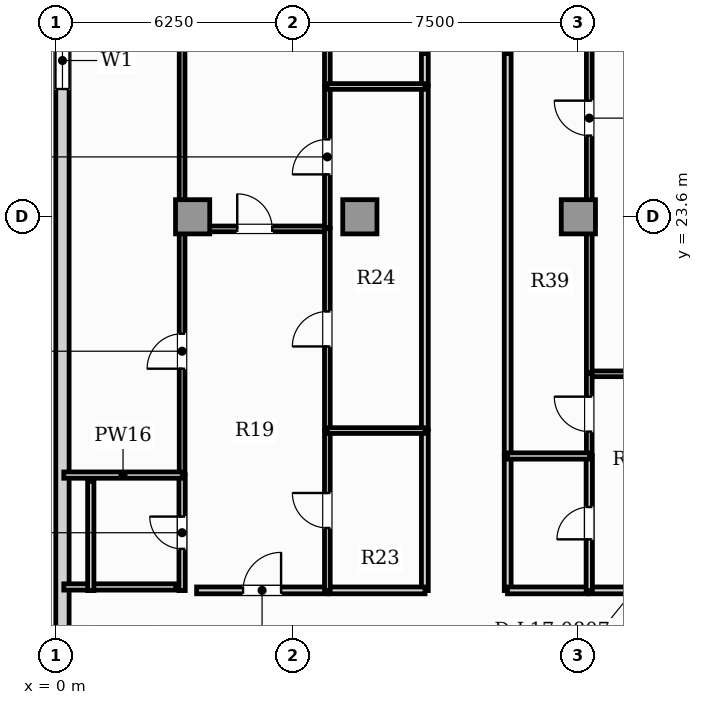
"""IFC4 building model, lengths in metres.
Left out: names, types, materials, properties, quantities, classifications, styles, units other than length and angle.
Written with IfcOpenShell. Run it as: python <this file> out.ifc"""

import sys

from ifc_helpers import new_model, si_unit, direction, frame, frame_2d, origin, origin_2d, place, context, subcontext, project, spatial, rectangle, extrude, element, fill, save


model = new_model("IFC4")
c1 = context("Model", 3, precision=1e-05, world=origin(), true_north=direction((0.0, 1.0)))
c2 = subcontext(c1, "Body", "Model", "MODEL_VIEW")
j1 = project(units=[si_unit("LENGTHUNIT", "METRE"), si_unit("PLANEANGLEUNIT", "RADIAN")], contexts=[c1])
p1 = place(None, origin())
s1 = spatial("IfcSite", under=j1, at=p1, CompositionType="ELEMENT")
p2 = place(p1, origin())
s2 = spatial("IfcBuilding", under=s1, at=p2, CompositionType="ELEMENT")
p3 = place(p2, frame((0.0, 0.0, 72.15)))
s3 = spatial("IfcBuildingStorey", under=s2, at=p3, CompositionType="ELEMENT", Elevation=72.15)
for number, where, z_axis, x_axis in (
    (1, (3.6, 23.6, 0.0), (0.0, 0.0, 1.0), (1.0, 0.0, 0.0)),
    (2, (8.0, 23.6, 0.0), (0.0, 0.0, 1.0), (1.0, 0.0, 0.0)),
    (3, (13.75, 23.6, 0.0), (0.0, 0.0, 1.0), (1.0, 0.0, 0.0)),
):
    element("IfcColumn", number, at=place(p3, frame(where, z_axis=z_axis, x_axis=x_axis)), inside=s3, PredefinedType="COLUMN", context=c2, shape_type="SweptSolid", body=[
        extrude(rectangle(XDim=0.9, YDim=0.9, at=origin_2d()), origin(), (0.0, 0.0, 1.0), 3.85),
    ])
p4 = place(p3, frame((0.175, 43.16, 0.0), z_axis=(0.0, 0.0, 1.0), x_axis=(0.0, -1.0, 0.0)))
e4 = element("IfcWall", 4, at=p4, inside=s3, PredefinedType="SOLIDWALL", context=c2, shape_type="SweptSolid", body=[
    extrude(rectangle(XDim=39.92, YDim=0.35, at=frame_2d((19.96, 0.0))), origin(), (0.0, 0.0, 1.0), 3.57),
])
p5 = place(p4, frame((3.34, 0.0, 0.95)))
e5 = element("IfcOpeningElement", 5, at=p5, cuts=e4, PredefinedType="OPENING", context=c2, shape_type="SweptSolid", body=[
    extrude(rectangle(XDim=0.9, YDim=1.5, at=frame_2d((0.45, 0.75))), frame((0.0, 0.185, 0.0), z_axis=(0.0, -1.0, 0.0), x_axis=(1.0, 0.0, 0.0)), (0.0, 0.0, 1.0), 0.37),
])
p6 = place(p4, frame((14.698, 0.0, 0.9)))
e6 = element("IfcOpeningElement", 6, at=p6, cuts=e4, PredefinedType="OPENING", context=c2, shape_type="SweptSolid", body=[
    extrude(rectangle(XDim=1.5, YDim=1.95, at=frame_2d((0.75, 0.975))), frame((0.0, 0.185, 0.0), z_axis=(0.0, -1.0, 0.0), x_axis=(1.0, 0.0, 0.0)), (0.0, 0.0, 1.0), 0.37),
])
p7 = place(p3, frame((3.705, 13.77, 0.0), z_axis=(0.0, 0.0, 1.0), x_axis=(1.0, 0.0, 0.0)))
e7 = element("IfcWall", 7, at=p7, inside=s3, PredefinedType="PARTITIONING", context=c2, shape_type="SweptSolid", body=[
    extrude(rectangle(XDim=3.445, YDim=0.18, at=frame_2d((1.722, 0.0))), origin(), (0.0, 0.0, 1.0), 3.57),
])
p8 = place(p7, frame((1.222, 0.0, 0.0)))
e8 = element("IfcOpeningElement", 8, at=p8, cuts=e7, PredefinedType="OPENING", context=c2, shape_type="SweptSolid", body=[
    extrude(rectangle(XDim=1.0, YDim=2.15, at=frame_2d((0.5, 1.075))), frame((0.0, 0.1, 0.0), z_axis=(0.0, -1.0, 0.0), x_axis=(1.0, 0.0, 0.0)), (0.0, 0.0, 1.0), 0.2),
])
p9 = place(p3, frame((9.71, 13.765, 0.0), z_axis=(0.0, 0.0, 1.0), x_axis=(0.0, 1.0, 0.0)))
e9 = element("IfcWall", 9, at=p9, inside=s3, PredefinedType="PARTITIONING", context=c2, shape_type="SweptSolid", body=[
    extrude(rectangle(XDim=4.215, YDim=0.18, at=frame_2d((2.107, 0.0))), origin(), (0.0, 0.0, 1.0), 3.57),
])
p10 = place(p3, frame((7.18, 13.77, 0.0), z_axis=(0.0, 0.0, 1.0), x_axis=(1.0, 0.0, 0.0)))
e10 = element("IfcWall", 10, at=p10, inside=s3, PredefinedType="PARTITIONING", context=c2, shape_type="SweptSolid", body=[
    extrude(rectangle(XDim=2.535, YDim=0.18, at=frame_2d((1.268, 0.0))), origin(), (0.0, 0.0, 1.0), 3.57),
])
p11 = place(p3, frame((9.71, 18.01, 0.0), z_axis=(0.0, 0.0, 1.0), x_axis=(0.0, 1.0, 0.0)))
e11 = element("IfcWall", 11, at=p11, inside=s3, PredefinedType="PARTITIONING", context=c2, shape_type="SweptSolid", body=[
    extrude(rectangle(XDim=9.024, YDim=0.18, at=frame_2d((4.512, 0.0))), origin(), (0.0, 0.0, 1.0), 3.57),
])
p12 = place(p3, frame((9.71, 27.064, 0.0), z_axis=(0.0, 0.0, 1.0), x_axis=(0.0, 1.0, 0.0)))
e12 = element("IfcWall", 12, at=p12, inside=s3, PredefinedType="PARTITIONING", context=c2, shape_type="SweptSolid", body=[
    extrude(rectangle(XDim=0.831, YDim=0.18, at=frame_2d((0.416, 0.0))), origin(), (0.0, 0.0, 1.0), 3.57),
])
p13 = place(p3, frame((14.031, 13.77, 0.0), z_axis=(0.0, 0.0, 1.0), x_axis=(1.0, 0.0, 0.0)))
e13 = element("IfcWall", 13, at=p13, inside=s3, PredefinedType="PARTITIONING", context=c2, shape_type="SweptSolid", body=[
    extrude(rectangle(XDim=3.206, YDim=0.18, at=frame_2d((1.603, 0.0))), origin(), (0.0, 0.0, 1.0), 3.57),
])
p14 = place(p13, frame((1.103, 0.0, 0.0)))
e14 = element("IfcOpeningElement", 14, at=p14, cuts=e13, PredefinedType="OPENING", context=c2, shape_type="SweptSolid", body=[
    extrude(rectangle(XDim=1.0, YDim=2.15, at=frame_2d((0.5, 1.075))), frame((0.0, 0.1, 0.0), z_axis=(0.0, -1.0, 0.0), x_axis=(1.0, 0.0, 0.0)), (0.0, 0.0, 1.0), 0.2),
])
p15 = place(p3, frame((11.89, 13.765, 0.0), z_axis=(0.0, 0.0, 1.0), x_axis=(0.0, 1.0, 0.0)))
e15 = element("IfcWall", 15, at=p15, inside=s3, PredefinedType="PARTITIONING", context=c2, shape_type="SweptSolid", body=[
    extrude(rectangle(XDim=3.546, YDim=0.18, at=frame_2d((1.773, 0.0))), origin(), (0.0, 0.0, 1.0), 3.57),
])
p16 = place(p3, frame((11.885, 13.77, 0.0), z_axis=(0.0, 0.0, 1.0), x_axis=(1.0, 0.0, 0.0)))
e16 = element("IfcWall", 16, at=p16, inside=s3, PredefinedType="PARTITIONING", context=c2, shape_type="SweptSolid", body=[
    extrude(rectangle(XDim=2.116, YDim=0.18, at=frame_2d((1.058, 0.0))), origin(), (0.0, 0.0, 1.0), 3.57),
])
p17 = place(p3, frame((11.89, 17.341, 0.0), z_axis=(0.0, 0.0, 1.0), x_axis=(0.0, 1.0, 0.0)))
e17 = element("IfcWall", 17, at=p17, inside=s3, PredefinedType="PARTITIONING", context=c2, shape_type="SweptSolid", body=[
    extrude(rectangle(XDim=10.554, YDim=0.18, at=frame_2d((5.277, 0.0))), origin(), (0.0, 0.0, 1.0), 3.57),
])
p18 = place(p3, frame((3.318, 23.282, 0.0), z_axis=(0.0, 0.0, 1.0), x_axis=(1.0, 0.0, 0.0)))
e18 = element("IfcWall", 18, at=p18, inside=s3, PredefinedType="PARTITIONING", context=c2, shape_type="SweptSolid", body=[
    extrude(rectangle(XDim=3.832, YDim=0.15, at=frame_2d((1.916, 0.0))), origin(), (0.0, 0.0, 1.0), 3.57),
])
p19 = place(p18, frame((1.456, 0.0, 0.0)))
e19 = element("IfcOpeningElement", 19, at=p19, cuts=e18, PredefinedType="OPENING", context=c2, shape_type="SweptSolid", body=[
    extrude(rectangle(XDim=0.92, YDim=2.1, at=frame_2d((0.46, 1.05))), frame((0.0, 0.085, 0.0), z_axis=(0.0, -1.0, 0.0), x_axis=(1.0, 0.0, 0.0)), (0.0, 0.0, 1.0), 0.17),
])
p20 = place(p3, frame((3.323, 13.765, 0.0), z_axis=(0.0, 0.0, 1.0), x_axis=(0.0, 1.0, 0.0)))
e20 = element("IfcWall", 20, at=p20, inside=s3, PredefinedType="PLUMBINGWALL", context=c2, shape_type="SweptSolid", body=[
    extrude(rectangle(XDim=3.044, YDim=0.165, at=frame_2d((1.522, 0.0))), origin(), (0.0, 0.0, 1.0), 3.57),
])
p21 = place(p20, frame((1.097, 0.0, 0.0)))
e21 = element("IfcOpeningElement", 21, at=p21, cuts=e20, PredefinedType="OPENING", context=c2, shape_type="SweptSolid", body=[
    extrude(rectangle(XDim=0.85, YDim=2.1, at=frame_2d((0.425, 1.05))), frame((0.0, 0.093, 0.0), z_axis=(0.0, -1.0, 0.0), x_axis=(1.0, 0.0, 0.0)), (0.0, 0.0, 1.0), 0.185),
])
p22 = place(p3, frame((3.323, 16.839, 0.0), z_axis=(0.0, 0.0, 1.0), x_axis=(0.0, 1.0, 0.0)))
e22 = element("IfcWall", 22, at=p22, inside=s3, PredefinedType="PARTITIONING", context=c2, shape_type="SweptSolid", body=[
    extrude(rectangle(XDim=6.448, YDim=0.15, at=frame_2d((3.224, 0.0))), origin(), (0.0, 0.0, 1.0), 3.57),
])
p23 = place(p22, frame((2.764, 0.0, 0.0)))
e23 = element("IfcOpeningElement", 23, at=p23, cuts=e22, PredefinedType="OPENING", context=c2, shape_type="SweptSolid", body=[
    extrude(rectangle(XDim=0.92, YDim=2.1, at=frame_2d((0.46, 1.05))), frame((0.0, 0.085, 0.0), z_axis=(0.0, -1.0, 0.0), x_axis=(1.0, 0.0, 0.0)), (0.0, 0.0, 1.0), 0.17),
])
p24 = place(p3, frame((7.145, 13.765, 0.0), z_axis=(0.0, 0.0, 1.0), x_axis=(0.0, 1.0, 0.0)))
e24 = element("IfcWall", 24, at=p24, inside=s3, PredefinedType="PARTITIONING", context=c2, shape_type="SweptSolid", body=[
    extrude(rectangle(XDim=4.215, YDim=0.15, at=frame_2d((2.107, 0.0))), origin(), (0.0, 0.0, 1.0), 3.57),
])
p25 = place(p24, frame((1.647, 0.0, 0.0)))
e25 = element("IfcOpeningElement", 25, at=p25, cuts=e24, PredefinedType="OPENING", context=c2, shape_type="SweptSolid", body=[
    extrude(rectangle(XDim=0.92, YDim=2.1, at=frame_2d((0.46, 1.05))), frame((0.0, 0.085, 0.0), z_axis=(0.0, -1.0, 0.0), x_axis=(1.0, 0.0, 0.0)), (0.0, 0.0, 1.0), 0.17),
])
p26 = place(p3, frame((7.145, 18.01, 0.0), z_axis=(0.0, 0.0, 1.0), x_axis=(0.0, 1.0, 0.0)))
e26 = element("IfcWall", 26, at=p26, inside=s3, PredefinedType="PARTITIONING", context=c2, shape_type="SweptSolid", body=[
    extrude(rectangle(XDim=5.277, YDim=0.15, at=frame_2d((2.639, 0.0))), origin(), (0.0, 0.0, 1.0), 3.57),
])
p27 = place(p26, frame((2.179, 0.0, 0.0)))
e27 = element("IfcOpeningElement", 27, at=p27, cuts=e26, PredefinedType="OPENING", context=c2, shape_type="SweptSolid", body=[
    extrude(rectangle(XDim=0.92, YDim=2.1, at=frame_2d((0.46, 1.05))), frame((0.0, 0.085, 0.0), z_axis=(0.0, -1.0, 0.0), x_axis=(1.0, 0.0, 0.0)), (0.0, 0.0, 1.0), 0.17),
])
p28 = place(p3, frame((3.323, 23.317, 0.0), z_axis=(0.0, 0.0, 1.0), x_axis=(0.0, 1.0, 0.0)))
e28 = element("IfcWall", 28, at=p28, inside=s3, PredefinedType="PARTITIONING", context=c2, shape_type="SweptSolid", body=[
    extrude(rectangle(XDim=15.308, YDim=0.15, at=frame_2d((7.654, 0.0))), origin(), (0.0, 0.0, 1.0), 3.57),
])
p29 = place(p28, frame((7.194, 0.0, 0.0)))
e29 = element("IfcOpeningElement", 29, at=p29, cuts=e28, PredefinedType="OPENING", context=c2, shape_type="SweptSolid", body=[
    extrude(rectangle(XDim=0.92, YDim=2.1, at=frame_2d((0.46, 1.05))), frame((0.0, 0.085, 0.0), z_axis=(0.0, -1.0, 0.0), x_axis=(1.0, 0.0, 0.0)), (0.0, 0.0, 1.0), 0.17),
])
p30 = place(p3, frame((7.145, 23.317, 0.0), z_axis=(0.0, 0.0, 1.0), x_axis=(0.0, 1.0, 0.0)))
e30 = element("IfcWall", 30, at=p30, inside=s3, PredefinedType="PARTITIONING", context=c2, shape_type="SweptSolid", body=[
    extrude(rectangle(XDim=3.717, YDim=0.15, at=frame_2d((1.858, 0.0))), origin(), (0.0, 0.0, 1.0), 3.57),
])
p31 = place(p30, frame((1.398, 0.0, 0.0)))
e31 = element("IfcOpeningElement", 31, at=p31, cuts=e30, PredefinedType="OPENING", context=c2, shape_type="SweptSolid", body=[
    extrude(rectangle(XDim=0.92, YDim=2.1, at=frame_2d((0.46, 1.05))), frame((0.0, 0.085, 0.0), z_axis=(0.0, -1.0, 0.0), x_axis=(1.0, 0.0, 0.0)), (0.0, 0.0, 1.0), 0.17),
])
p32 = place(p3, frame((7.145, 27.064, 0.0), z_axis=(0.0, 0.0, 1.0), x_axis=(0.0, 1.0, 0.0)))
e32 = element("IfcWall", 32, at=p32, inside=s3, PredefinedType="PARTITIONING", context=c2, shape_type="SweptSolid", body=[
    extrude(rectangle(XDim=11.561, YDim=0.15, at=frame_2d((5.781, 0.0))), origin(), (0.0, 0.0, 1.0), 3.57),
])
p33 = place(p32, frame((5.321, 0.0, 0.0)))
e33 = element("IfcOpeningElement", 33, at=p33, cuts=e32, PredefinedType="OPENING", context=c2, shape_type="SweptSolid", body=[
    extrude(rectangle(XDim=0.92, YDim=2.1, at=frame_2d((0.46, 1.05))), frame((0.0, 0.085, 0.0), z_axis=(0.0, -1.0, 0.0), x_axis=(1.0, 0.0, 0.0)), (0.0, 0.0, 1.0), 0.17),
])
p34 = place(p3, frame((0.21, 16.804, 0.0), z_axis=(0.0, 0.0, 1.0), x_axis=(1.0, 0.0, 0.0)))
e34 = element("IfcWall", 34, at=p34, inside=s3, PredefinedType="PLUMBINGWALL", context=c2, shape_type="SweptSolid", body=[
    extrude(rectangle(XDim=3.118, YDim=0.165, at=frame_2d((1.559, 0.0))), origin(), (0.0, 0.0, 1.0), 3.57),
])
for number, where, z_axis, x_axis in (
    (35, (7.14, 17.975, 0.0), (0.0, 0.0, 1.0), (1.0, 0.0, 0.0)),
    (36, (7.14, 27.029, 0.0), (0.0, 0.0, 1.0), (1.0, 0.0, 0.0)),
):
    element("IfcWall", number, at=place(p3, frame(where, z_axis=z_axis, x_axis=x_axis)), inside=s3, PredefinedType="PARTITIONING", context=c2, shape_type="SweptSolid", body=[
        extrude(rectangle(XDim=2.575, YDim=0.15, at=frame_2d((1.288, 0.0))), origin(), (0.0, 0.0, 1.0), 3.57),
    ])
p35 = place(p3, frame((14.031, 19.469, 0.0), z_axis=(0.0, 0.0, 1.0), x_axis=(1.0, 0.0, 0.0)))
e37 = element("IfcWall", 37, at=p35, inside=s3, PredefinedType="PARTITIONING", context=c2, shape_type="SweptSolid", body=[
    extrude(rectangle(XDim=3.206, YDim=0.15, at=frame_2d((1.603, 0.0))), origin(), (0.0, 0.0, 1.0), 3.57),
])
p36 = place(p35, frame((1.143, 0.0, 0.0)))
e38 = element("IfcOpeningElement", 38, at=p36, cuts=e37, PredefinedType="OPENING", context=c2, shape_type="SweptSolid", body=[
    extrude(rectangle(XDim=0.92, YDim=2.1, at=frame_2d((0.46, 1.05))), frame((0.0, 0.085, 0.0), z_axis=(0.0, -1.0, 0.0), x_axis=(1.0, 0.0, 0.0)), (0.0, 0.0, 1.0), 0.17),
])
p37 = place(p3, frame((14.037, 13.765, 0.0), z_axis=(0.0, 0.0, 1.0), x_axis=(0.0, 1.0, 0.0)))
e39 = element("IfcWall", 39, at=p37, inside=s3, PredefinedType="PLUMBINGWALL", context=c2, shape_type="SweptSolid", body=[
    extrude(rectangle(XDim=3.546, YDim=0.165, at=frame_2d((1.773, 0.0))), origin(), (0.0, 0.0, 1.0), 3.57),
])
p38 = place(p37, frame((1.348, 0.0, 0.0)))
e40 = element("IfcOpeningElement", 40, at=p38, cuts=e39, PredefinedType="OPENING", context=c2, shape_type="SweptSolid", body=[
    extrude(rectangle(XDim=0.85, YDim=2.1, at=frame_2d((0.425, 1.05))), frame((0.0, 0.093, 0.0), z_axis=(0.0, -1.0, 0.0), x_axis=(1.0, 0.0, 0.0)), (0.0, 0.0, 1.0), 0.185),
])
p39 = place(p3, frame((14.037, 17.341, 0.0), z_axis=(0.0, 0.0, 1.0), x_axis=(0.0, 1.0, 0.0)))
e41 = element("IfcWall", 41, at=p39, inside=s3, PredefinedType="PARTITIONING", context=c2, shape_type="SweptSolid", body=[
    extrude(rectangle(XDim=2.132, YDim=0.15, at=frame_2d((1.066, 0.0))), origin(), (0.0, 0.0, 1.0), 3.57),
])
p40 = place(p39, frame((0.606, 0.0, 0.0)))
e42 = element("IfcOpeningElement", 42, at=p40, cuts=e41, PredefinedType="OPENING", context=c2, shape_type="SweptSolid", body=[
    extrude(rectangle(XDim=0.92, YDim=2.1, at=frame_2d((0.46, 1.05))), frame((0.0, 0.085, 0.0), z_axis=(0.0, -1.0, 0.0), x_axis=(1.0, 0.0, 0.0)), (0.0, 0.0, 1.0), 0.17),
])
p41 = place(p3, frame((14.037, 19.504, 0.0), z_axis=(0.0, 0.0, 1.0), x_axis=(0.0, 1.0, 0.0)))
e43 = element("IfcWall", 43, at=p41, inside=s3, PredefinedType="PARTITIONING", context=c2, shape_type="SweptSolid", body=[
    extrude(rectangle(XDim=19.121, YDim=0.15, at=frame_2d((9.561, 0.0))), origin(), (0.0, 0.0, 1.0), 3.57),
])
p42 = place(p41, frame((6.232, 0.0, 0.0)))
e44 = element("IfcOpeningElement", 44, at=p42, cuts=e43, PredefinedType="OPENING", context=c2, shape_type="SweptSolid", body=[
    extrude(rectangle(XDim=0.92, YDim=2.1, at=frame_2d((0.46, 1.05))), frame((0.0, 0.085, 0.0), z_axis=(0.0, -1.0, 0.0), x_axis=(1.0, 0.0, 0.0)), (0.0, 0.0, 1.0), 0.17),
])
p43 = place(p3, frame((11.885, 17.306, 0.0), z_axis=(0.0, 0.0, 1.0), x_axis=(1.0, 0.0, 0.0)))
e45 = element("IfcWall", 45, at=p43, inside=s3, PredefinedType="PLUMBINGWALL", context=c2, shape_type="SweptSolid", body=[
    extrude(rectangle(XDim=2.156, YDim=0.165, at=frame_2d((1.078, 0.0))), origin(), (0.0, 0.0, 1.0), 3.57),
])
p44 = place(p3, frame((3.158, 13.86, 0.0), z_axis=(0.0, 0.0, 1.0), x_axis=(-1.0, 0.0, 0.0)))
e46 = element("IfcWall", 46, at=p44, inside=s3, PredefinedType="PLUMBINGWALL", context=c2, shape_type="SweptSolid", body=[
    extrude(rectangle(XDim=2.948, YDim=0.165, at=frame_2d((1.474, 0.0))), origin(), (0.0, 0.0, 1.0), 3.57),
])
p45 = place(p3, frame((0.92, 13.765, 0.0), z_axis=(0.0, 0.0, 1.0), x_axis=(0.0, 1.0, 0.0)))
e47 = element("IfcWall", 47, at=p45, inside=s3, PredefinedType="PLUMBINGWALL", context=c2, shape_type="SweptSolid", body=[
    extrude(rectangle(XDim=2.874, YDim=0.165, at=frame_2d((1.437, 0.0))), origin(), (0.0, 0.0, 1.0), 3.57),
])
p46 = place(p6, origin())
e48 = element("IfcWindow", 48, at=p46, inside=s3, PartitioningType="SINGLE_PANEL", PredefinedType="WINDOW", context=c2, shape_type="SweptSolid", body=[
    extrude(rectangle(XDim=1.5, YDim=1.95, at=frame_2d((0.75, 0.975))), frame((0.0, 0.03, 0.0), z_axis=(0.0, -1.0, 0.0), x_axis=(1.0, 0.0, 0.0)), (0.0, 0.0, 1.0), 0.06),
])
fill(e6, e48)
p47 = place(p8, origin())
e49 = element("IfcDoor", 49, at=p47, inside=s3, OperationType="SINGLE_SWING_RIGHT", PredefinedType="DOOR", context=c2, shape_type="SweptSolid", body=[
    extrude(rectangle(XDim=1.0, YDim=2.15, at=frame_2d((0.5, 1.075))), frame((0.0, 0.025, 0.0), z_axis=(0.0, -1.0, 0.0), x_axis=(1.0, 0.0, 0.0)), (0.0, 0.0, 1.0), 0.05),
])
fill(e8, e49)
p48 = place(p19, origin())
e50 = element("IfcDoor", 50, at=p48, inside=s3, OperationType="SINGLE_SWING_LEFT", PredefinedType="DOOR", context=c2, shape_type="SweptSolid", body=[
    extrude(rectangle(XDim=0.92, YDim=2.1, at=frame_2d((0.46, 1.05))), frame((0.0, 0.025, 0.0), z_axis=(0.0, -1.0, 0.0), x_axis=(1.0, 0.0, 0.0)), (0.0, 0.0, 1.0), 0.05),
])
fill(e19, e50)
p49 = place(p21, origin())
e51 = element("IfcDoor", 51, at=p49, inside=s3, OperationType="SINGLE_SWING_RIGHT", PredefinedType="DOOR", context=c2, shape_type="SweptSolid", body=[
    extrude(rectangle(XDim=0.85, YDim=2.1, at=frame_2d((0.425, 1.05))), frame((0.0, 0.025, 0.0), z_axis=(0.0, -1.0, 0.0), x_axis=(1.0, 0.0, 0.0)), (0.0, 0.0, 1.0), 0.05),
])
fill(e21, e51)
p50 = place(p23, origin())
e52 = element("IfcDoor", 52, at=p50, inside=s3, OperationType="SINGLE_SWING_LEFT", PredefinedType="DOOR", context=c2, shape_type="SweptSolid", body=[
    extrude(rectangle(XDim=0.92, YDim=2.1, at=frame_2d((0.46, 1.05))), frame((0.0, 0.025, 0.0), z_axis=(0.0, -1.0, 0.0), x_axis=(1.0, 0.0, 0.0)), (0.0, 0.0, 1.0), 0.05),
])
fill(e23, e52)
p51 = place(p25, origin())
e53 = element("IfcDoor", 53, at=p51, inside=s3, OperationType="SINGLE_SWING_RIGHT", PredefinedType="DOOR", context=c2, shape_type="SweptSolid", body=[
    extrude(rectangle(XDim=0.92, YDim=2.1, at=frame_2d((0.46, 1.05))), frame((0.0, 0.025, 0.0), z_axis=(0.0, -1.0, 0.0), x_axis=(1.0, 0.0, 0.0)), (0.0, 0.0, 1.0), 0.05),
])
fill(e25, e53)
p52 = place(p27, origin())
e54 = element("IfcDoor", 54, at=p52, inside=s3, OperationType="SINGLE_SWING_LEFT", PredefinedType="DOOR", context=c2, shape_type="SweptSolid", body=[
    extrude(rectangle(XDim=0.92, YDim=2.1, at=frame_2d((0.46, 1.05))), frame((0.0, 0.025, 0.0), z_axis=(0.0, -1.0, 0.0), x_axis=(1.0, 0.0, 0.0)), (0.0, 0.0, 1.0), 0.05),
])
fill(e27, e54)
p53 = place(p31, origin())
e55 = element("IfcDoor", 55, at=p53, inside=s3, OperationType="SINGLE_SWING_LEFT", PredefinedType="DOOR", context=c2, shape_type="SweptSolid", body=[
    extrude(rectangle(XDim=0.92, YDim=2.1, at=frame_2d((0.46, 1.05))), frame((0.0, 0.025, 0.0), z_axis=(0.0, -1.0, 0.0), x_axis=(1.0, 0.0, 0.0)), (0.0, 0.0, 1.0), 0.05),
])
fill(e31, e55)
p54 = place(p38, origin())
e56 = element("IfcDoor", 56, at=p54, inside=s3, OperationType="SINGLE_SWING_LEFT", PredefinedType="DOOR", context=c2, shape_type="SweptSolid", body=[
    extrude(rectangle(XDim=0.85, YDim=2.1, at=frame_2d((0.425, 1.05))), frame((0.0, 0.025, 0.0), z_axis=(0.0, -1.0, 0.0), x_axis=(1.0, 0.0, 0.0)), (0.0, 0.0, 1.0), 0.05),
])
fill(e40, e56)
p55 = place(p40, origin())
e57 = element("IfcDoor", 57, at=p55, inside=s3, OperationType="SINGLE_SWING_RIGHT", PredefinedType="DOOR", context=c2, shape_type="SweptSolid", body=[
    extrude(rectangle(XDim=0.92, YDim=2.1, at=frame_2d((0.46, 1.05))), frame((0.0, 0.025, 0.0), z_axis=(0.0, -1.0, 0.0), x_axis=(1.0, 0.0, 0.0)), (0.0, 0.0, 1.0), 0.05),
])
fill(e42, e57)
p56 = place(p42, origin())
e58 = element("IfcDoor", 58, at=p56, inside=s3, OperationType="SINGLE_SWING_RIGHT", PredefinedType="DOOR", context=c2, shape_type="SweptSolid", body=[
    extrude(rectangle(XDim=0.92, YDim=2.1, at=frame_2d((0.46, 1.05))), frame((0.0, 0.025, 0.0), z_axis=(0.0, -1.0, 0.0), x_axis=(1.0, 0.0, 0.0)), (0.0, 0.0, 1.0), 0.05),
])
fill(e44, e58)
save(model, sys.argv[1])
